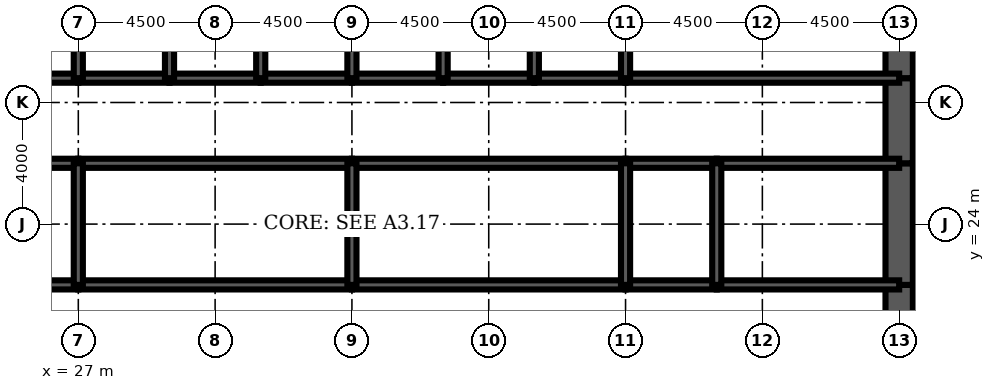
"""IFC4 building model, lengths in metres.
Left out: names, types, materials, properties, quantities, classifications, styles, units other than length and angle.
Written with IfcOpenShell. Run it as: python <this file> out.ifc"""

import sys

from ifc_helpers import new_model, si_unit, direction, frame, frame_2d, origin, place, context, subcontext, project, spatial, rectangle, extrude, element, fill, save


model = new_model("IFC4")
c1 = context("Model", 3, precision=1e-05, world=origin(), true_north=direction((0.0, 1.0)))
c2 = subcontext(c1, "Body", "Model", "MODEL_VIEW")
j1 = project(units=[si_unit("LENGTHUNIT", "METRE"), si_unit("PLANEANGLEUNIT", "RADIAN")], contexts=[c1])
p1 = place(None, origin())
s1 = spatial("IfcSite", under=j1, at=p1, CompositionType="ELEMENT")
p2 = place(p1, origin())
s2 = spatial("IfcBuilding", under=s1, at=p2, CompositionType="ELEMENT")
p3 = place(p2, frame((0.0, 0.0, 72.5)))
s3 = spatial("IfcBuildingStorey", under=s2, at=p3, CompositionType="ELEMENT", Elevation=72.5)
p4 = place(p3, frame((54.0, 19.2, 0.0), z_axis=(0.0, 0.0, 1.0), x_axis=(0.0, 1.0, 0.0)))
e1 = element("IfcWall", 1, at=p4, inside=s3, PredefinedType="SHEAR", context=c2, shape_type="SweptSolid", body=[
    extrude(rectangle(XDim=2.8, YDim=0.9, at=frame_2d((1.4, 0.0))), origin(), (0.0, 0.0, 1.0), 4.5),
])
p5 = place(p4, frame((0.4, 0.0, 0.0)))
e2 = element("IfcOpeningElement", 2, at=p5, cuts=e1, PredefinedType="OPENING", context=c2, shape_type="SweptSolid", body=[
    extrude(rectangle(XDim=1.8, YDim=2.1, at=frame_2d((0.9, 1.05))), frame((0.0, 0.46, 0.0), z_axis=(0.0, -1.0, 0.0), x_axis=(1.0, 0.0, 0.0)), (0.0, 0.0, 1.0), 0.92),
])
p6 = place(p3, frame((54.0, 22.0, 0.0), z_axis=(0.0, 0.0, 1.0), x_axis=(0.0, 1.0, 0.0)))
e3 = element("IfcWall", 3, at=p6, inside=s3, PredefinedType="SHEAR", context=c2, shape_type="SweptSolid", body=[
    extrude(rectangle(XDim=4.0, YDim=0.9, at=frame_2d((2.0, 0.0))), origin(), (0.0, 0.0, 1.0), 4.5),
])
p7 = place(p3, frame((54.0, 26.0, 0.0), z_axis=(0.0, 0.0, 1.0), x_axis=(0.0, 1.0, 0.0)))
e4 = element("IfcWall", 4, at=p7, inside=s3, PredefinedType="SHEAR", context=c2, shape_type="SweptSolid", body=[
    extrude(rectangle(XDim=2.8, YDim=0.9, at=frame_2d((1.4, 0.0))), origin(), (0.0, 0.0, 1.0), 4.5),
])
p8 = place(p7, frame((0.6, 0.0, 0.0)))
e5 = element("IfcOpeningElement", 5, at=p8, cuts=e4, PredefinedType="OPENING", context=c2, shape_type="SweptSolid", body=[
    extrude(rectangle(XDim=1.8, YDim=2.1, at=frame_2d((0.9, 1.05))), frame((0.0, 0.46, 0.0), z_axis=(0.0, -1.0, 0.0), x_axis=(1.0, 0.0, 0.0)), (0.0, 0.0, 1.0), 0.92),
])
p9 = place(p3, frame((54.0, 28.8, 0.0), z_axis=(0.0, 0.0, 1.0), x_axis=(0.0, 1.0, 0.0)))
e6 = element("IfcWall", 6, at=p9, inside=s3, PredefinedType="SHEAR", context=c2, shape_type="SweptSolid", body=[
    extrude(rectangle(XDim=3.2, YDim=0.9, at=frame_2d((1.6, 0.0))), origin(), (0.0, 0.0, 1.0), 4.5),
])
p10 = place(p3, frame((18.0, 28.8, 0.0), z_axis=(0.0, 0.0, 1.0), x_axis=(1.0, 0.0, 0.0)))
e7 = element("IfcWall", 7, at=p10, inside=s3, PredefinedType="SOLIDWALL", context=c2, shape_type="SweptSolid", body=[
    extrude(rectangle(XDim=9.0, YDim=0.3, at=frame_2d((4.5, 0.0))), origin(), (0.0, 0.0, 1.0), 4.5),
])
p11 = place(p10, frame((0.65, 0.0, 0.0)))
e8 = element("IfcOpeningElement", 8, at=p11, cuts=e7, PredefinedType="OPENING", context=c2, shape_type="SweptSolid", body=[
    extrude(rectangle(XDim=1.0, YDim=2.1, at=frame_2d((0.5, 1.05))), frame((0.0, 0.16, 0.0), z_axis=(0.0, -1.0, 0.0), x_axis=(1.0, 0.0, 0.0)), (0.0, 0.0, 1.0), 0.32),
])
p12 = place(p3, frame((27.0, 28.8, 0.0), z_axis=(0.0, 0.0, 1.0), x_axis=(1.0, 0.0, 0.0)))
e9 = element("IfcWall", 9, at=p12, inside=s3, PredefinedType="SOLIDWALL", context=c2, shape_type="SweptSolid", body=[
    extrude(rectangle(XDim=3.0, YDim=0.3, at=frame_2d((1.5, 0.0))), origin(), (0.0, 0.0, 1.0), 4.5),
])
p13 = place(p12, frame((0.95, 0.0, 0.0)))
e10 = element("IfcOpeningElement", 10, at=p13, cuts=e9, PredefinedType="OPENING", context=c2, shape_type="SweptSolid", body=[
    extrude(rectangle(XDim=1.1, YDim=2.2, at=frame_2d((0.55, 1.1))), frame((0.0, 0.16, 0.0), z_axis=(0.0, -1.0, 0.0), x_axis=(1.0, 0.0, 0.0)), (0.0, 0.0, 1.0), 0.32),
])
p14 = place(p3, frame((30.0, 28.8, 0.0), z_axis=(0.0, 0.0, 1.0), x_axis=(1.0, 0.0, 0.0)))
e11 = element("IfcWall", 11, at=p14, inside=s3, PredefinedType="SOLIDWALL", context=c2, shape_type="SweptSolid", body=[
    extrude(rectangle(XDim=3.0, YDim=0.3, at=frame_2d((1.5, 0.0))), origin(), (0.0, 0.0, 1.0), 4.5),
])
p15 = place(p14, frame((0.95, 0.0, 0.0)))
e12 = element("IfcOpeningElement", 12, at=p15, cuts=e11, PredefinedType="OPENING", context=c2, shape_type="SweptSolid", body=[
    extrude(rectangle(XDim=1.1, YDim=2.2, at=frame_2d((0.55, 1.1))), frame((0.0, 0.16, 0.0), z_axis=(0.0, -1.0, 0.0), x_axis=(1.0, 0.0, 0.0)), (0.0, 0.0, 1.0), 0.32),
])
p16 = place(p3, frame((33.0, 28.8, 0.0), z_axis=(0.0, 0.0, 1.0), x_axis=(1.0, 0.0, 0.0)))
e13 = element("IfcWall", 13, at=p16, inside=s3, PredefinedType="SOLIDWALL", context=c2, shape_type="SweptSolid", body=[
    extrude(rectangle(XDim=3.0, YDim=0.3, at=frame_2d((1.5, 0.0))), origin(), (0.0, 0.0, 1.0), 4.5),
])
p17 = place(p16, frame((0.95, 0.0, 0.0)))
e14 = element("IfcOpeningElement", 14, at=p17, cuts=e13, PredefinedType="OPENING", context=c2, shape_type="SweptSolid", body=[
    extrude(rectangle(XDim=1.1, YDim=2.2, at=frame_2d((0.55, 1.1))), frame((0.0, 0.16, 0.0), z_axis=(0.0, -1.0, 0.0), x_axis=(1.0, 0.0, 0.0)), (0.0, 0.0, 1.0), 0.32),
])
for number, where, z_axis, x_axis in (
    (15, (36.0, 28.8, 0.0), (0.0, 0.0, 1.0), (1.0, 0.0, 0.0)),
    (16, (39.0, 28.8, 0.0), (0.0, 0.0, 1.0), (1.0, 0.0, 0.0)),
):
    element("IfcWall", number, at=place(p3, frame(where, z_axis=z_axis, x_axis=x_axis)), inside=s3, PredefinedType="SOLIDWALL", context=c2, shape_type="SweptSolid", body=[
        extrude(rectangle(XDim=3.0, YDim=0.3, at=frame_2d((1.5, 0.0))), origin(), (0.0, 0.0, 1.0), 4.5),
    ])
p18 = place(p3, frame((42.0, 28.8, 0.0), z_axis=(0.0, 0.0, 1.0), x_axis=(1.0, 0.0, 0.0)))
e17 = element("IfcWall", 17, at=p18, inside=s3, PredefinedType="SOLIDWALL", context=c2, shape_type="SweptSolid", body=[
    extrude(rectangle(XDim=3.0, YDim=0.3, at=frame_2d((1.5, 0.0))), origin(), (0.0, 0.0, 1.0), 4.5),
])
p19 = place(p18, frame((0.95, 0.0, 0.0)))
e18 = element("IfcOpeningElement", 18, at=p19, cuts=e17, PredefinedType="OPENING", context=c2, shape_type="SweptSolid", body=[
    extrude(rectangle(XDim=1.1, YDim=2.2, at=frame_2d((0.55, 1.1))), frame((0.0, 0.16, 0.0), z_axis=(0.0, -1.0, 0.0), x_axis=(1.0, 0.0, 0.0)), (0.0, 0.0, 1.0), 0.32),
])
p20 = place(p3, frame((45.0, 28.8, 0.0), z_axis=(0.0, 0.0, 1.0), x_axis=(1.0, 0.0, 0.0)))
e19 = element("IfcWall", 19, at=p20, inside=s3, PredefinedType="SOLIDWALL", context=c2, shape_type="SweptSolid", body=[
    extrude(rectangle(XDim=9.0, YDim=0.3, at=frame_2d((4.5, 0.0))), origin(), (0.0, 0.0, 1.0), 4.5),
])
p21 = place(p20, frame((7.35, 0.0, 0.0)))
e20 = element("IfcOpeningElement", 20, at=p21, cuts=e19, PredefinedType="OPENING", context=c2, shape_type="SweptSolid", body=[
    extrude(rectangle(XDim=1.0, YDim=2.1, at=frame_2d((0.5, 1.05))), frame((0.0, 0.16, 0.0), z_axis=(0.0, -1.0, 0.0), x_axis=(1.0, 0.0, 0.0)), (0.0, 0.0, 1.0), 0.32),
])
p22 = place(p3, frame((24.0, 22.0, 0.0), z_axis=(0.0, 0.0, 1.0), x_axis=(1.0, 0.0, 0.0)))
e21 = element("IfcWall", 21, at=p22, inside=s3, PredefinedType="SOLIDWALL", context=c2, shape_type="SweptSolid", body=[
    extrude(rectangle(XDim=3.0, YDim=0.3, at=frame_2d((1.5, 0.0))), origin(), (0.0, 0.0, 1.0), 4.5),
])
p23 = place(p22, frame((1.0, 0.0, 0.0)))
e22 = element("IfcOpeningElement", 22, at=p23, cuts=e21, PredefinedType="OPENING", context=c2, shape_type="SweptSolid", body=[
    extrude(rectangle(XDim=1.0, YDim=2.1, at=frame_2d((0.5, 1.05))), frame((0.0, 0.16, 0.0), z_axis=(0.0, -1.0, 0.0), x_axis=(1.0, 0.0, 0.0)), (0.0, 0.0, 1.0), 0.32),
])
p24 = place(p3, frame((27.0, 22.0, 0.0), z_axis=(0.0, 0.0, 1.0), x_axis=(1.0, 0.0, 0.0)))
e23 = element("IfcWall", 23, at=p24, inside=s3, PredefinedType="SOLIDWALL", context=c2, shape_type="SweptSolid", body=[
    extrude(rectangle(XDim=9.0, YDim=0.3, at=frame_2d((4.5, 0.0))), origin(), (0.0, 0.0, 1.0), 4.5),
])
p25 = place(p24, frame((4.0, 0.0, 0.0)))
e24 = element("IfcOpeningElement", 24, at=p25, cuts=e23, PredefinedType="OPENING", context=c2, shape_type="SweptSolid", body=[
    extrude(rectangle(XDim=1.0, YDim=2.1, at=frame_2d((0.5, 1.05))), frame((0.0, 0.16, 0.0), z_axis=(0.0, -1.0, 0.0), x_axis=(1.0, 0.0, 0.0)), (0.0, 0.0, 1.0), 0.32),
])
p26 = place(p3, frame((36.0, 22.0, 0.0), z_axis=(0.0, 0.0, 1.0), x_axis=(1.0, 0.0, 0.0)))
e25 = element("IfcWall", 25, at=p26, inside=s3, PredefinedType="SOLIDWALL", context=c2, shape_type="SweptSolid", body=[
    extrude(rectangle(XDim=9.0, YDim=0.3, at=frame_2d((4.5, 0.0))), origin(), (0.0, 0.0, 1.0), 4.5),
])
p27 = place(p26, frame((4.0, 0.0, 0.0)))
e26 = element("IfcOpeningElement", 26, at=p27, cuts=e25, PredefinedType="OPENING", context=c2, shape_type="SweptSolid", body=[
    extrude(rectangle(XDim=1.0, YDim=2.1, at=frame_2d((0.5, 1.05))), frame((0.0, 0.16, 0.0), z_axis=(0.0, -1.0, 0.0), x_axis=(1.0, 0.0, 0.0)), (0.0, 0.0, 1.0), 0.32),
])
p28 = place(p3, frame((45.0, 22.0, 0.0), z_axis=(0.0, 0.0, 1.0), x_axis=(1.0, 0.0, 0.0)))
e27 = element("IfcWall", 27, at=p28, inside=s3, PredefinedType="SOLIDWALL", context=c2, shape_type="SweptSolid", body=[
    extrude(rectangle(XDim=3.0, YDim=0.3, at=frame_2d((1.5, 0.0))), origin(), (0.0, 0.0, 1.0), 4.5),
])
p29 = place(p28, frame((1.0, 0.0, 0.0)))
e28 = element("IfcOpeningElement", 28, at=p29, cuts=e27, PredefinedType="OPENING", context=c2, shape_type="SweptSolid", body=[
    extrude(rectangle(XDim=1.0, YDim=2.1, at=frame_2d((0.5, 1.05))), frame((0.0, 0.16, 0.0), z_axis=(0.0, -1.0, 0.0), x_axis=(1.0, 0.0, 0.0)), (0.0, 0.0, 1.0), 0.32),
])
p30 = place(p3, frame((48.0, 22.0, 0.0), z_axis=(0.0, 0.0, 1.0), x_axis=(1.0, 0.0, 0.0)))
e29 = element("IfcWall", 29, at=p30, inside=s3, PredefinedType="SOLIDWALL", context=c2, shape_type="SweptSolid", body=[
    extrude(rectangle(XDim=6.0, YDim=0.3, at=frame_2d((3.0, 0.0))), origin(), (0.0, 0.0, 1.0), 4.5),
])
p31 = place(p30, frame((2.0, 0.0, 0.0)))
e30 = element("IfcOpeningElement", 30, at=p31, cuts=e29, PredefinedType="OPENING", context=c2, shape_type="SweptSolid", body=[
    extrude(rectangle(XDim=1.0, YDim=2.1, at=frame_2d((0.5, 1.05))), frame((0.0, 0.16, 0.0), z_axis=(0.0, -1.0, 0.0), x_axis=(1.0, 0.0, 0.0)), (0.0, 0.0, 1.0), 0.32),
])
p32 = place(p30, frame((4.3, 0.0, 0.0)))
e31 = element("IfcOpeningElement", 31, at=p32, cuts=e29, PredefinedType="OPENING", context=c2, shape_type="SweptSolid", body=[
    extrude(rectangle(XDim=1.0, YDim=2.1, at=frame_2d((0.5, 1.05))), frame((0.0, 0.16, 0.0), z_axis=(0.0, -1.0, 0.0), x_axis=(1.0, 0.0, 0.0)), (0.0, 0.0, 1.0), 0.32),
])
p33 = place(p3, frame((24.0, 26.0, 0.0), z_axis=(0.0, 0.0, 1.0), x_axis=(1.0, 0.0, 0.0)))
e32 = element("IfcWall", 32, at=p33, inside=s3, PredefinedType="SOLIDWALL", context=c2, shape_type="SweptSolid", body=[
    extrude(rectangle(XDim=3.0, YDim=0.3, at=frame_2d((1.5, 0.0))), origin(), (0.0, 0.0, 1.0), 4.5),
])
for number, where, z_axis, x_axis in (
    (33, (27.0, 26.0, 0.0), (0.0, 0.0, 1.0), (1.0, 0.0, 0.0)),
    (34, (36.0, 26.0, 0.0), (0.0, 0.0, 1.0), (1.0, 0.0, 0.0)),
):
    element("IfcWall", number, at=place(p3, frame(where, z_axis=z_axis, x_axis=x_axis)), inside=s3, PredefinedType="SOLIDWALL", context=c2, shape_type="SweptSolid", body=[
        extrude(rectangle(XDim=9.0, YDim=0.3, at=frame_2d((4.5, 0.0))), origin(), (0.0, 0.0, 1.0), 4.5),
    ])
p34 = place(p3, frame((45.0, 26.0, 0.0), z_axis=(0.0, 0.0, 1.0), x_axis=(1.0, 0.0, 0.0)))
e35 = element("IfcWall", 35, at=p34, inside=s3, PredefinedType="SOLIDWALL", context=c2, shape_type="SweptSolid", body=[
    extrude(rectangle(XDim=3.0, YDim=0.3, at=frame_2d((1.5, 0.0))), origin(), (0.0, 0.0, 1.0), 4.5),
])
p35 = place(p3, frame((48.0, 26.0, 0.0), z_axis=(0.0, 0.0, 1.0), x_axis=(1.0, 0.0, 0.0)))
e36 = element("IfcWall", 36, at=p35, inside=s3, PredefinedType="SOLIDWALL", context=c2, shape_type="SweptSolid", body=[
    extrude(rectangle(XDim=6.0, YDim=0.3, at=frame_2d((3.0, 0.0))), origin(), (0.0, 0.0, 1.0), 4.5),
])
for number, where, z_axis, x_axis in (
    (37, (27.0, 28.8, 0.0), (0.0, 0.0, 1.0), (0.0, 1.0, 0.0)),
    (38, (30.0, 28.8, 0.0), (0.0, 0.0, 1.0), (0.0, 1.0, 0.0)),
    (39, (33.0, 28.8, 0.0), (0.0, 0.0, 1.0), (0.0, 1.0, 0.0)),
    (40, (36.0, 28.8, 0.0), (0.0, 0.0, 1.0), (0.0, 1.0, 0.0)),
    (41, (39.0, 28.8, 0.0), (0.0, 0.0, 1.0), (0.0, 1.0, 0.0)),
    (42, (42.0, 28.8, 0.0), (0.0, 0.0, 1.0), (0.0, 1.0, 0.0)),
    (43, (45.0, 28.8, 0.0), (0.0, 0.0, 1.0), (0.0, 1.0, 0.0)),
):
    element("IfcWall", number, at=place(p3, frame(where, z_axis=z_axis, x_axis=x_axis)), inside=s3, PredefinedType="SOLIDWALL", context=c2, shape_type="SweptSolid", body=[
        extrude(rectangle(XDim=3.2, YDim=0.3, at=frame_2d((1.6, 0.0))), origin(), (0.0, 0.0, 1.0), 4.5),
    ])
for number, where, z_axis, x_axis in (
    (44, (27.0, 22.0, 0.0), (0.0, 0.0, 1.0), (0.0, 1.0, 0.0)),
    (45, (36.0, 22.0, 0.0), (0.0, 0.0, 1.0), (0.0, 1.0, 0.0)),
    (46, (45.0, 22.0, 0.0), (0.0, 0.0, 1.0), (0.0, 1.0, 0.0)),
    (47, (48.0, 22.0, 0.0), (0.0, 0.0, 1.0), (0.0, 1.0, 0.0)),
):
    element("IfcWall", number, at=place(p3, frame(where, z_axis=z_axis, x_axis=x_axis)), inside=s3, PredefinedType="SOLIDWALL", context=c2, shape_type="SweptSolid", body=[
        extrude(rectangle(XDim=4.0, YDim=0.3, at=frame_2d((2.0, 0.0))), origin(), (0.0, 0.0, 1.0), 4.5),
    ])
p36 = place(p3, frame((42.5, 22.15, 0.0), z_axis=(0.0, 0.0, 1.0), x_axis=(0.0, 1.0, 0.0)))
e48 = element("IfcWall", 48, at=p36, inside=s3, PredefinedType="PARTITIONING", context=c2, shape_type="SweptSolid", body=[
    extrude(rectangle(XDim=3.7, YDim=0.15, at=frame_2d((1.85, 0.0))), origin(), (0.0, 0.0, 1.0), 3.0),
])
p37 = place(p36, frame((2.2, 0.0, 0.0)))
e49 = element("IfcOpeningElement", 49, at=p37, cuts=e48, PredefinedType="OPENING", context=c2, shape_type="SweptSolid", body=[
    extrude(rectangle(XDim=1.0, YDim=2.1, at=frame_2d((0.5, 1.05))), frame((0.0, 0.085, 0.0), z_axis=(0.0, -1.0, 0.0), x_axis=(1.0, 0.0, 0.0)), (0.0, 0.0, 1.0), 0.17),
])
p38 = place(p3, frame((51.975, 22.15, 0.0), z_axis=(0.0, 0.0, 1.0), x_axis=(0.0, 1.0, 0.0)))
e50 = element("IfcWall", 50, at=p38, inside=s3, PredefinedType="PARTITIONING", context=c2, shape_type="SweptSolid", body=[
    extrude(rectangle(XDim=3.7, YDim=0.15, at=frame_2d((1.85, 0.0))), origin(), (0.0, 0.0, 1.0), 3.0),
])
p39 = place(p3, frame((46.2, 26.15, 0.0), z_axis=(0.0, 0.0, 1.0), x_axis=(0.0, 1.0, 0.0)))
e51 = element("IfcWall", 51, at=p39, inside=s3, PredefinedType="PARTITIONING", context=c2, shape_type="SweptSolid", body=[
    extrude(rectangle(XDim=2.5, YDim=0.15, at=frame_2d((1.25, 0.0))), origin(), (0.0, 0.0, 1.0), 3.0),
])
p40 = place(p39, frame((1.15, 0.0, 0.0)))
e52 = element("IfcOpeningElement", 52, at=p40, cuts=e51, PredefinedType="OPENING", context=c2, shape_type="SweptSolid", body=[
    extrude(rectangle(XDim=1.0, YDim=2.1, at=frame_2d((0.5, 1.05))), frame((0.0, 0.085, 0.0), z_axis=(0.0, -1.0, 0.0), x_axis=(1.0, 0.0, 0.0)), (0.0, 0.0, 1.0), 0.17),
])
p41 = place(p37, origin())
e53 = element("IfcDoor", 53, at=p41, inside=s3, OperationType="SINGLE_SWING_RIGHT", PredefinedType="DOOR", context=c2, shape_type="SweptSolid", body=[
    extrude(rectangle(XDim=1.0, YDim=2.1, at=frame_2d((0.5, 1.05))), frame((0.0, 0.025, 0.0), z_axis=(0.0, -1.0, 0.0), x_axis=(1.0, 0.0, 0.0)), (0.0, 0.0, 1.0), 0.05),
])
fill(e49, e53)
p42 = place(p40, origin())
e54 = element("IfcDoor", 54, at=p42, inside=s3, OperationType="SINGLE_SWING_RIGHT", PredefinedType="DOOR", context=c2, shape_type="SweptSolid", body=[
    extrude(rectangle(XDim=1.0, YDim=2.1, at=frame_2d((0.5, 1.05))), frame((0.0, 0.025, 0.0), z_axis=(0.0, -1.0, 0.0), x_axis=(1.0, 0.0, 0.0)), (0.0, 0.0, 1.0), 0.05),
])
fill(e52, e54)
p43 = place(p19, origin())
e55 = element("IfcDoor", 55, at=p43, inside=s3, OperationType="DOUBLE_DOOR_SLIDING", PredefinedType="USERDEFINED", context=c2, shape_type="SweptSolid", body=[
    extrude(rectangle(XDim=1.1, YDim=2.2, at=frame_2d((0.55, 1.1))), frame((0.0, 0.025, 0.0), z_axis=(0.0, -1.0, 0.0), x_axis=(1.0, 0.0, 0.0)), (0.0, 0.0, 1.0), 0.05),
])
fill(e18, e55)
p44 = place(p13, origin())
e56 = element("IfcDoor", 56, at=p44, inside=s3, OperationType="DOUBLE_DOOR_SLIDING", PredefinedType="USERDEFINED", context=c2, shape_type="SweptSolid", body=[
    extrude(rectangle(XDim=1.1, YDim=2.2, at=frame_2d((0.55, 1.1))), frame((0.0, 0.025, 0.0), z_axis=(0.0, -1.0, 0.0), x_axis=(1.0, 0.0, 0.0)), (0.0, 0.0, 1.0), 0.05),
])
fill(e10, e56)
p45 = place(p15, origin())
e57 = element("IfcDoor", 57, at=p45, inside=s3, OperationType="DOUBLE_DOOR_SLIDING", PredefinedType="USERDEFINED", context=c2, shape_type="SweptSolid", body=[
    extrude(rectangle(XDim=1.1, YDim=2.2, at=frame_2d((0.55, 1.1))), frame((0.0, 0.025, 0.0), z_axis=(0.0, -1.0, 0.0), x_axis=(1.0, 0.0, 0.0)), (0.0, 0.0, 1.0), 0.05),
])
fill(e12, e57)
p46 = place(p17, origin())
e58 = element("IfcDoor", 58, at=p46, inside=s3, OperationType="DOUBLE_DOOR_SLIDING", PredefinedType="USERDEFINED", context=c2, shape_type="SweptSolid", body=[
    extrude(rectangle(XDim=1.1, YDim=2.2, at=frame_2d((0.55, 1.1))), frame((0.0, 0.025, 0.0), z_axis=(0.0, -1.0, 0.0), x_axis=(1.0, 0.0, 0.0)), (0.0, 0.0, 1.0), 0.05),
])
fill(e14, e58)
p47 = place(p21, origin())
e59 = element("IfcDoor", 59, at=p47, inside=s3, OperationType="SINGLE_SWING_RIGHT", PredefinedType="DOOR", context=c2, shape_type="SweptSolid", body=[
    extrude(rectangle(XDim=1.0, YDim=2.1, at=frame_2d((0.5, 1.05))), frame((0.0, 0.025, 0.0), z_axis=(0.0, -1.0, 0.0), x_axis=(1.0, 0.0, 0.0)), (0.0, 0.0, 1.0), 0.05),
])
fill(e20, e59)
p48 = place(p5, origin())
e60 = element("IfcDoor", 60, at=p48, inside=s3, OperationType="SINGLE_SWING_LEFT", PredefinedType="DOOR", context=c2, shape_type="SweptSolid", body=[
    extrude(rectangle(XDim=1.8, YDim=2.1, at=frame_2d((0.9, 1.05))), frame((0.0, 0.45, 0.0), z_axis=(0.0, -1.0, 0.0), x_axis=(1.0, 0.0, 0.0)), (0.0, 0.0, 1.0), 0.899),
])
fill(e2, e60)
p49 = place(p8, origin())
e61 = element("IfcDoor", 61, at=p49, inside=s3, OperationType="SINGLE_SWING_LEFT", PredefinedType="DOOR", context=c2, shape_type="SweptSolid", body=[
    extrude(rectangle(XDim=1.8, YDim=2.1, at=frame_2d((0.9, 1.05))), frame((0.0, 0.45, 0.0), z_axis=(0.0, -1.0, 0.0), x_axis=(1.0, 0.0, 0.0)), (0.0, 0.0, 1.0), 0.899),
])
fill(e5, e61)
p50 = place(p25, origin())
e62 = element("IfcDoor", 62, at=p50, inside=s3, OperationType="SINGLE_SWING_LEFT", PredefinedType="DOOR", context=c2, shape_type="SweptSolid", body=[
    extrude(rectangle(XDim=1.0, YDim=2.1, at=frame_2d((0.5, 1.05))), frame((0.0, 0.025, 0.0), z_axis=(0.0, -1.0, 0.0), x_axis=(1.0, 0.0, 0.0)), (0.0, 0.0, 1.0), 0.05),
])
fill(e24, e62)
p51 = place(p27, origin())
e63 = element("IfcDoor", 63, at=p51, inside=s3, OperationType="SINGLE_SWING_LEFT", PredefinedType="DOOR", context=c2, shape_type="SweptSolid", body=[
    extrude(rectangle(XDim=1.0, YDim=2.1, at=frame_2d((0.5, 1.05))), frame((0.0, 0.025, 0.0), z_axis=(0.0, -1.0, 0.0), x_axis=(1.0, 0.0, 0.0)), (0.0, 0.0, 1.0), 0.05),
])
fill(e26, e63)
p52 = place(p29, origin())
e64 = element("IfcDoor", 64, at=p52, inside=s3, OperationType="SINGLE_SWING_LEFT", PredefinedType="DOOR", context=c2, shape_type="SweptSolid", body=[
    extrude(rectangle(XDim=1.0, YDim=2.1, at=frame_2d((0.5, 1.05))), frame((0.0, 0.025, 0.0), z_axis=(0.0, -1.0, 0.0), x_axis=(1.0, 0.0, 0.0)), (0.0, 0.0, 1.0), 0.05),
])
fill(e28, e64)
p53 = place(p31, origin())
e65 = element("IfcDoor", 65, at=p53, inside=s3, OperationType="SINGLE_SWING_LEFT", PredefinedType="DOOR", context=c2, shape_type="SweptSolid", body=[
    extrude(rectangle(XDim=1.0, YDim=2.1, at=frame_2d((0.5, 1.05))), frame((0.0, 0.025, 0.0), z_axis=(0.0, -1.0, 0.0), x_axis=(1.0, 0.0, 0.0)), (0.0, 0.0, 1.0), 0.05),
])
fill(e30, e65)
p54 = place(p32, origin())
e66 = element("IfcDoor", 66, at=p54, inside=s3, OperationType="SINGLE_SWING_RIGHT", PredefinedType="DOOR", context=c2, shape_type="SweptSolid", body=[
    extrude(rectangle(XDim=1.0, YDim=2.1, at=frame_2d((0.5, 1.05))), frame((0.0, 0.025, 0.0), z_axis=(0.0, -1.0, 0.0), x_axis=(1.0, 0.0, 0.0)), (0.0, 0.0, 1.0), 0.05),
])
fill(e31, e66)
save(model, sys.argv[1])
